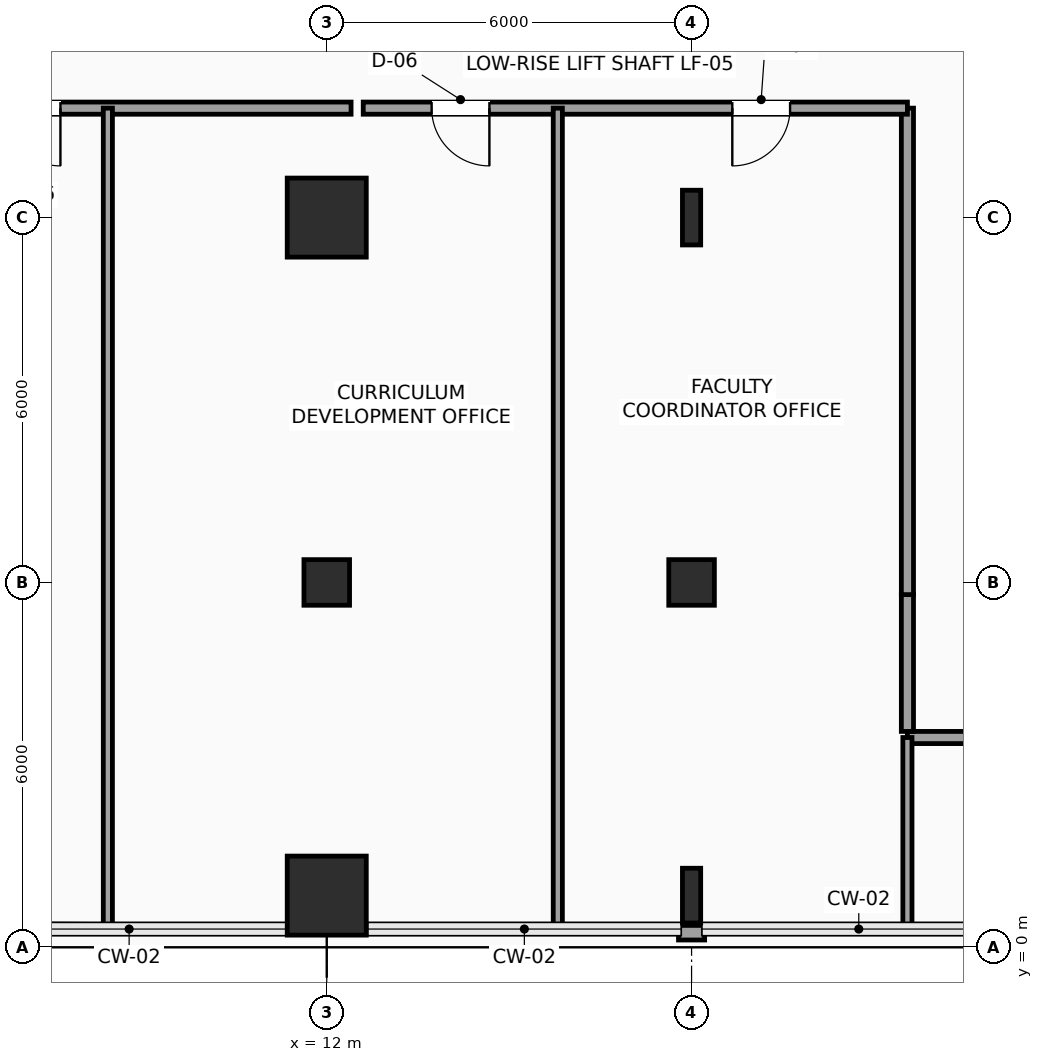
"""IFC4 building model, lengths in metres.
Left out: names, types, materials, properties, quantities, classifications, styles, units other than length and angle.
Written with IfcOpenShell. Run it as: python <this file> out.ifc"""

import sys

from ifc_helpers import new_model, si_unit, direction, frame, frame_2d, origin, origin_2d, place, context, subcontext, project, spatial, rectangle, hollow_rectangle, i_section, extrude, element, fill, save


model = new_model("IFC4")
c1 = context("Model", 3, precision=1e-05, world=origin(), true_north=direction((0.0, 1.0)))
c2 = subcontext(c1, "Body", "Model", "MODEL_VIEW")
j1 = project(units=[si_unit("LENGTHUNIT", "METRE"), si_unit("PLANEANGLEUNIT", "RADIAN")], contexts=[c1])
p1 = place(None, origin())
s1 = spatial("IfcSite", under=j1, at=p1, CompositionType="ELEMENT")
p2 = place(p1, origin())
s2 = spatial("IfcBuilding", under=s1, at=p2, CompositionType="ELEMENT")
p3 = place(p2, frame((0.0, 0.0, 59.7)))
s3 = spatial("IfcBuildingStorey", under=s2, at=p3, CompositionType="ELEMENT", Elevation=59.7)
p4 = place(p3, frame((12.0, 0.85, 0.0), z_axis=(0.0, 0.0, 1.0), x_axis=(1.0, 0.0, 0.0)))
e1 = element("IfcColumn", 1, at=p4, inside=s3, PredefinedType="COLUMN", context=c2, shape_type="SweptSolid", body=[
    extrude(rectangle(XDim=1.3, YDim=1.3, at=origin_2d()), origin(), (0.0, 0.0, 1.0), 3.9),
])
p5 = place(p3, frame((12.0, 6.0, 0.0), z_axis=(0.0, 0.0, 1.0), x_axis=(1.0, 0.0, 0.0)))
e2 = element("IfcColumn", 2, at=p5, inside=s3, PredefinedType="COLUMN", context=c2, shape_type="SweptSolid", body=[
    extrude(hollow_rectangle(XDim=0.75, YDim=0.75, WallThickness=0.035, InnerFilletRadius=0.035, OuterFilletRadius=0.05, at=origin_2d()), origin(), (0.0, 0.0, 1.0), 3.9),
])
p6 = place(p3, frame((12.0, 12.0, 0.0), z_axis=(0.0, 0.0, 1.0), x_axis=(1.0, 0.0, 0.0)))
e3 = element("IfcColumn", 3, at=p6, inside=s3, PredefinedType="COLUMN", context=c2, shape_type="SweptSolid", body=[
    extrude(rectangle(XDim=1.3, YDim=1.3, at=origin_2d()), origin(), (0.0, 0.0, 1.0), 3.9),
])
p7 = place(p3, frame((18.0, 0.85, 0.0), z_axis=(0.0, 0.0, 1.0), x_axis=(1.0, 0.0, 0.0)))
e4 = element("IfcColumn", 4, at=p7, inside=s3, PredefinedType="COLUMN", context=c2, shape_type="SweptSolid", body=[
    extrude(i_section(OverallWidth=0.3, OverallDepth=0.9, WebThickness=0.019, FlangeThickness=0.035, FilletRadius=0.03, at=origin_2d()), origin(), (0.0, 0.0, 1.0), 3.9),
])
p8 = place(p3, frame((18.0, 6.0, 0.0), z_axis=(0.0, 0.0, 1.0), x_axis=(1.0, 0.0, 0.0)))
e5 = element("IfcColumn", 5, at=p8, inside=s3, PredefinedType="COLUMN", context=c2, shape_type="SweptSolid", body=[
    extrude(hollow_rectangle(XDim=0.75, YDim=0.75, WallThickness=0.035, InnerFilletRadius=0.035, OuterFilletRadius=0.05, at=origin_2d()), origin(), (0.0, 0.0, 1.0), 3.9),
])
p9 = place(p3, frame((18.0, 12.0, 0.0), z_axis=(0.0, 0.0, 1.0), x_axis=(1.0, 0.0, 0.0)))
e6 = element("IfcColumn", 6, at=p9, inside=s3, PredefinedType="COLUMN", context=c2, shape_type="SweptSolid", body=[
    extrude(i_section(OverallWidth=0.3, OverallDepth=0.9, WebThickness=0.019, FlangeThickness=0.035, FilletRadius=0.03, at=origin_2d()), origin(), (0.0, 0.0, 1.0), 3.9),
])
p10 = place(p3, frame((18.215, 0.24, 0.0), z_axis=(0.0, 0.0, 1.0), x_axis=(-1.0, 0.0, 0.0)))
e7 = element("IfcWall", 7, at=p10, inside=s3, PredefinedType="SOLIDWALL", context=c2, shape_type="SweptSolid", body=[
    extrude(rectangle(XDim=0.43, YDim=0.24, at=frame_2d((0.215, 0.0))), origin(), (0.0, 0.0, 1.0), 3.65),
])
p11 = place(p3, frame((36.15, 3.45, 0.0), z_axis=(0.0, 0.0, 1.0), x_axis=(-1.0, 0.0, 0.0)))
e8 = element("IfcWall", 8, at=p11, inside=s3, PredefinedType="SOLIDWALL", context=c2, shape_type="SweptSolid", body=[
    extrude(rectangle(XDim=14.6, YDim=0.2, at=frame_2d((7.3, 0.0))), origin(), (0.0, 0.0, 1.0), 3.142),
])
p12 = place(p11, frame((11.3, 0.0, 0.0)))
e9 = element("IfcOpeningElement", 9, at=p12, cuts=e8, PredefinedType="OPENING", context=c2, shape_type="SweptSolid", body=[
    extrude(rectangle(XDim=0.95, YDim=2.15, at=frame_2d((0.475, 1.075))), frame((0.0, 0.11, 0.0), z_axis=(0.0, -1.0, 0.0), x_axis=(1.0, 0.0, 0.0)), (0.0, 0.0, 1.0), 0.22),
])
p13 = place(p11, frame((5.675, 0.0, 0.0)))
e10 = element("IfcOpeningElement", 10, at=p13, cuts=e8, PredefinedType="OPENING", context=c2, shape_type="SweptSolid", body=[
    extrude(rectangle(XDim=0.95, YDim=2.15, at=frame_2d((0.475, 1.075))), frame((0.0, 0.11, 0.0), z_axis=(0.0, -1.0, 0.0), x_axis=(1.0, 0.0, 0.0)), (0.0, 0.0, 1.0), 0.22),
])
p14 = place(p3, frame((21.55, 3.55, 0.0), z_axis=(0.0, 0.0, 1.0), x_axis=(0.0, 1.0, 0.0)))
e11 = element("IfcWall", 11, at=p14, inside=s3, PredefinedType="SOLIDWALL", context=c2, shape_type="SweptSolid", body=[
    extrude(rectangle(XDim=2.25, YDim=0.2, at=frame_2d((1.125, 0.0))), origin(), (0.0, 0.0, 1.0), 3.65),
])
p15 = place(p3, frame((21.55, 5.8, 0.0), z_axis=(0.0, 0.0, 1.0), x_axis=(0.0, 1.0, 0.0)))
e12 = element("IfcWall", 12, at=p15, inside=s3, PredefinedType="SOLIDWALL", context=c2, shape_type="SweptSolid", body=[
    extrude(rectangle(XDim=8.0, YDim=0.2, at=frame_2d((4.0, 0.0))), origin(), (0.0, 0.0, 1.0), 3.65),
])
p16 = place(p3, frame((21.55, 13.8, 0.0), z_axis=(0.0, 0.0, 1.0), x_axis=(-1.0, 0.0, 0.0)))
e13 = element("IfcWall", 13, at=p16, inside=s3, PredefinedType="SOLIDWALL", context=c2, shape_type="SweptSolid", body=[
    extrude(rectangle(XDim=8.95, YDim=0.2, at=frame_2d((4.475, 0.0))), origin(), (0.0, 0.0, 1.0), 3.65),
])
p17 = place(p16, frame((6.875, 0.0, 0.0)))
e14 = element("IfcOpeningElement", 14, at=p17, cuts=e13, PredefinedType="OPENING", context=c2, shape_type="SweptSolid", body=[
    extrude(rectangle(XDim=0.95, YDim=2.15, at=frame_2d((0.475, 1.075))), frame((0.0, 0.11, 0.0), z_axis=(0.0, -1.0, 0.0), x_axis=(1.0, 0.0, 0.0)), (0.0, 0.0, 1.0), 0.22),
])
p18 = place(p16, frame((1.93, 0.0, 0.0)))
e15 = element("IfcOpeningElement", 15, at=p18, cuts=e13, PredefinedType="OPENING", context=c2, shape_type="SweptSolid", body=[
    extrude(rectangle(XDim=0.95, YDim=2.15, at=frame_2d((0.475, 1.075))), frame((0.0, 0.11, 0.0), z_axis=(0.0, -1.0, 0.0), x_axis=(1.0, 0.0, 0.0)), (0.0, 0.0, 1.0), 0.22),
])
p19 = place(p3, frame((12.4, 13.8, 0.0), z_axis=(0.0, 0.0, 1.0), x_axis=(-1.0, 0.0, 0.0)))
e16 = element("IfcWall", 16, at=p19, inside=s3, PredefinedType="SOLIDWALL", context=c2, shape_type="SweptSolid", body=[
    extrude(rectangle(XDim=7.15, YDim=0.2, at=frame_2d((3.575, 0.0))), origin(), (0.0, 0.0, 1.0), 3.65),
])
p20 = place(p19, frame((4.78, 0.0, 0.0)))
e17 = element("IfcOpeningElement", 17, at=p20, cuts=e16, PredefinedType="OPENING", context=c2, shape_type="SweptSolid", body=[
    extrude(rectangle(XDim=0.95, YDim=2.15, at=frame_2d((0.475, 1.075))), frame((0.0, 0.11, 0.0), z_axis=(0.0, -1.0, 0.0), x_axis=(1.0, 0.0, 0.0)), (0.0, 0.0, 1.0), 0.22),
])
p21 = place(p3, frame((6.215, 0.314, 0.0), z_axis=(0.0, 0.0, 1.0), x_axis=(0.99998042128, -0.006257559905, 0.0)))
e18 = element("IfcWall", 18, at=p21, inside=s3, PredefinedType="PARTITIONING", context=c2, shape_type="SweptSolid", body=[
    extrude(rectangle(XDim=2.185, YDim=0.15, at=frame_2d((1.092, 0.0))), origin(), (0.0, 0.0, 1.0), 3.65),
])
for number, where, z_axis, x_axis in (
    (19, (8.4, 0.3, 0.0), (0.0, 0.0, 1.0), (0.0, 1.0, 0.0)),
    (20, (15.8, 0.3, 0.0), (0.0, 0.0, 1.0), (0.0, 1.0, 0.0)),
):
    element("IfcWall", number, at=place(p3, frame(where, z_axis=z_axis, x_axis=x_axis)), inside=s3, PredefinedType="PARTITIONING", context=c2, shape_type="SweptSolid", body=[
        extrude(rectangle(XDim=13.5, YDim=0.15, at=frame_2d((6.75, 0.0))), origin(), (0.0, 0.0, 1.0), 3.65),
    ])
p22 = place(p3, frame((21.55, 0.3, 0.0), z_axis=(0.0, 0.0, 1.0), x_axis=(0.0, 1.0, 0.0)))
e21 = element("IfcWall", 21, at=p22, inside=s3, PredefinedType="PARTITIONING", context=c2, shape_type="SweptSolid", body=[
    extrude(rectangle(XDim=3.15, YDim=0.15, at=frame_2d((1.575, 0.0))), origin(), (0.0, 0.0, 1.0), 3.65),
])
p23 = place(p17, origin())
e22 = element("IfcDoor", 22, at=p23, inside=s3, OperationType="SINGLE_SWING_LEFT", PredefinedType="DOOR", context=c2, shape_type="SweptSolid", body=[
    extrude(rectangle(XDim=0.95, YDim=2.15, at=frame_2d((0.475, 1.075))), frame((0.0, 0.025, 0.0), z_axis=(0.0, -1.0, 0.0), x_axis=(1.0, 0.0, 0.0)), (0.0, 0.0, 1.0), 0.05),
])
fill(e14, e22)
p24 = place(p18, origin())
e23 = element("IfcDoor", 23, at=p24, inside=s3, OperationType="SINGLE_SWING_RIGHT", PredefinedType="DOOR", context=c2, shape_type="SweptSolid", body=[
    extrude(rectangle(XDim=0.95, YDim=2.15, at=frame_2d((0.475, 1.075))), frame((0.0, 0.025, 0.0), z_axis=(0.0, -1.0, 0.0), x_axis=(1.0, 0.0, 0.0)), (0.0, 0.0, 1.0), 0.05),
])
fill(e15, e23)
p25 = place(p20, origin())
e24 = element("IfcDoor", 24, at=p25, inside=s3, OperationType="SINGLE_SWING_LEFT", PredefinedType="DOOR", context=c2, shape_type="SweptSolid", body=[
    extrude(rectangle(XDim=0.95, YDim=2.15, at=frame_2d((0.475, 1.075))), frame((0.0, 0.025, 0.0), z_axis=(0.0, -1.0, 0.0), x_axis=(1.0, 0.0, 0.0)), (0.0, 0.0, 1.0), 0.05),
])
fill(e17, e24)
save(model, sys.argv[1])
